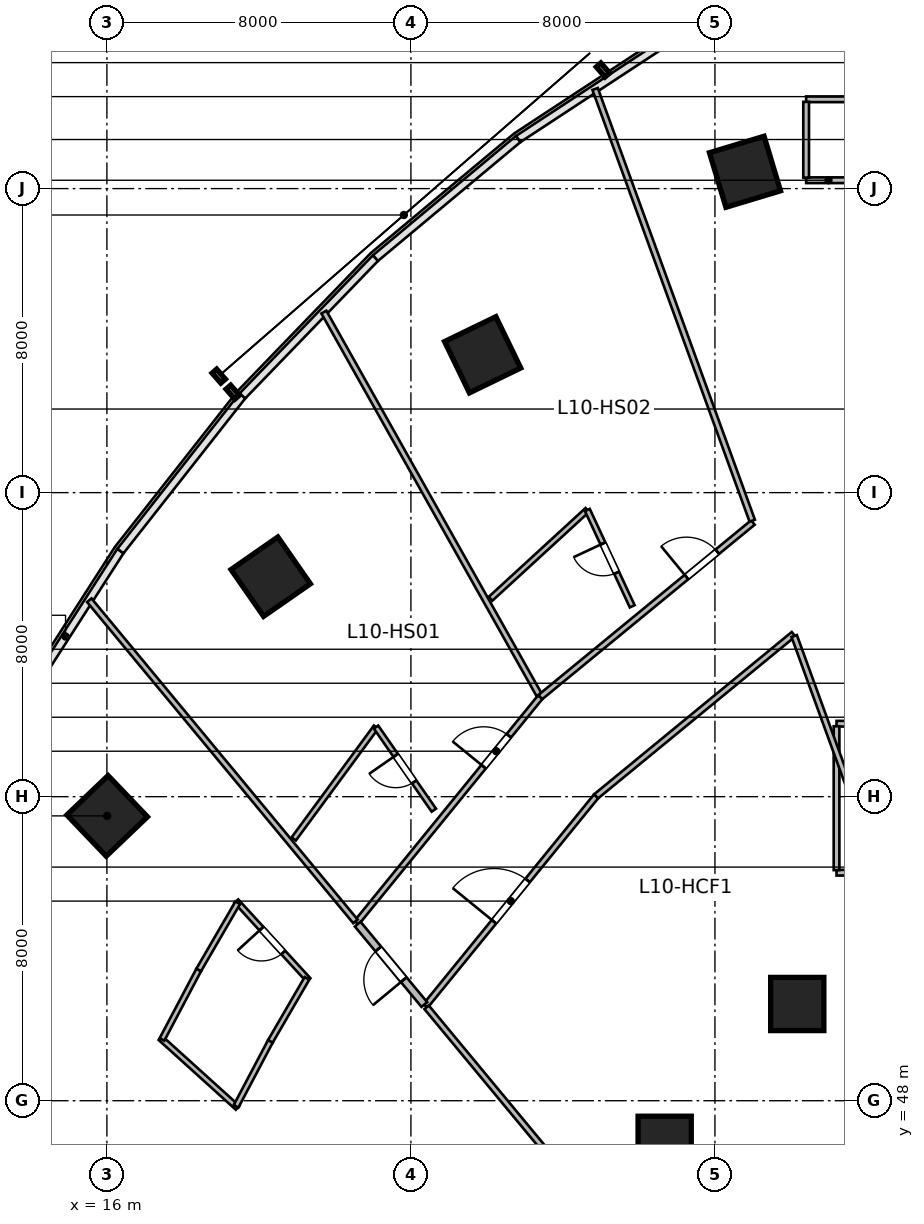
"""IFC4 building model, lengths in metres.
Left out: names, types, materials, properties, quantities, classifications, styles, units other than length and angle.
Written with IfcOpenShell. Run it as: python <this file> out.ifc"""

import sys

from ifc_helpers import new_model, si_unit, direction, frame, frame_2d, origin, origin_2d, place, context, subcontext, project, spatial, rectangle, circle, extrude, source, transform, mapped, element, fill, save


model = new_model("IFC4")
c1 = context("Model", 3, precision=1e-05, world=origin(), true_north=direction((0.0, 1.0)))
c2 = subcontext(c1, "Body", "Model", "MODEL_VIEW")
j1 = project(units=[si_unit("LENGTHUNIT", "METRE"), si_unit("PLANEANGLEUNIT", "RADIAN")], contexts=[c1])
p1 = place(None, origin())
s1 = spatial("IfcSite", under=j1, at=p1, CompositionType="ELEMENT")
p2 = place(p1, origin())
s2 = spatial("IfcBuilding", under=s1, at=p2, CompositionType="ELEMENT")
p3 = place(p2, frame((0.0, 0.0, 49.8)))
s3 = spatial("IfcBuildingStorey", under=s2, at=p3, CompositionType="ELEMENT", Elevation=49.8)
m1 = source(origin(), c2, "Body", "SweptSolid", [
    extrude(rectangle(XDim=1.5, YDim=1.5, at=origin_2d()), origin(), (0.0, 0.0, 1.0), 3.6),
])
p4 = place(p3, frame((16.007, 55.494, 0.0), z_axis=(0.0, 0.0, 1.0), x_axis=(-0.690756218984, 0.723087716626, 0.0)))
e1 = element("IfcColumn", 1, at=p4, inside=s3, PredefinedType="COLUMN", context=c2, shape_type="MappedRepresentation", body=[
    mapped(m1, transform((0.0, 0.0, 0.0), scale=1.0)),
])
m2 = source(origin(), c2, "Body", "SweptSolid", [
    extrude(circle(Radius=0.7, at=origin_2d()), origin(), (0.0, 0.0, 1.0), 3.6),
])
p5 = place(p3, frame((30.677, 46.892, 0.0), z_axis=(0.0, 0.0, 1.0), x_axis=(-0.571143442153, 0.820850271661, 0.0)))
e2 = element("IfcColumn", 2, at=p5, inside=s3, PredefinedType="COLUMN", context=c2, shape_type="MappedRepresentation", body=[
    mapped(m2, transform((0.0, 0.0, 0.0), scale=1.0)),
])
p6 = place(p3, frame((20.311, 61.789, 0.0), z_axis=(0.0, 0.0, 1.0), x_axis=(-0.571143442153, 0.820850271661, 0.0)))
e3 = element("IfcColumn", 3, at=p6, inside=s3, PredefinedType="COLUMN", context=c2, shape_type="MappedRepresentation", body=[
    mapped(m1, transform((0.0, 0.0, 0.0), scale=1.0)),
])
p7 = place(p3, frame((34.166, 50.545, 0.0), z_axis=(0.0, 0.0, 1.0), x_axis=(-0.436173672171, 0.899862504889, 0.0)))
e4 = element("IfcColumn", 4, at=p7, inside=s3, PredefinedType="COLUMN", context=c2, shape_type="MappedRepresentation", body=[
    mapped(m2, transform((0.0, 0.0, 0.0), scale=1.0)),
])
for number, where, z_axis, x_axis in (
    (5, (25.888, 67.627, 0.0), (0.0, 0.0, 1.0), (-0.436, 0.9, 0.0)),
    (6, (32.791, 72.442, 0.0), (0.0, 0.0, 1.0), (-0.289, 0.957, 0.0)),
):
    element("IfcColumn", number, at=place(p3, frame(where, z_axis=z_axis, x_axis=x_axis)), inside=s3, PredefinedType="COLUMN", context=c2, shape_type="MappedRepresentation", body=[
        mapped(m1, transform((0.0, 0.0, 0.0), scale=1.0)),
    ])
m3 = source(origin(), c2, "Body", "SweptSolid", [
    extrude(rectangle(XDim=2.1, YDim=0.15, at=frame_2d((1.05, 0.0))), origin(), (0.0, 0.0, 1.0), 3.36),
])
p8 = place(p3, frame((34.4, 72.22, 0.0), z_axis=(0.0, 0.0, 1.0), x_axis=(1.0, 0.0, 0.0)))
e7 = element("IfcWall", 7, at=p8, inside=s3, PredefinedType="PARTITIONING", context=c2, shape_type="MappedRepresentation", body=[
    mapped(m3, transform((0.0, 0.0, 0.0), scale=1.0)),
])
m4 = source(origin(), c2, "Body", "SweptSolid", [
    extrude(rectangle(XDim=3.1, YDim=0.15, at=frame_2d((1.55, 0.0))), origin(), (0.0, 0.0, 1.0), 2.729),
])
p9 = place(p3, frame((34.4, 74.35, 0.0), z_axis=(0.0, 0.0, 1.0), x_axis=(1.0, 0.0, 0.0)))
e8 = element("IfcWall", 8, at=p9, inside=s3, PredefinedType="PARTITIONING", context=c2, shape_type="MappedRepresentation", body=[
    mapped(m4, transform((0.0, 0.0, 0.0), scale=1.0)),
])
m5 = source(origin(), c2, "Body", "SweptSolid", [
    extrude(rectangle(XDim=1.995, YDim=0.15, at=frame_2d((0.998, 0.0))), origin(), (0.0, 0.0, 1.0), 3.36),
])
p10 = place(p3, frame((34.4, 72.288, 0.0), z_axis=(0.0, 0.0, 1.0), x_axis=(0.0, 1.0, 0.0)))
e9 = element("IfcWall", 9, at=p10, inside=s3, PredefinedType="PARTITIONING", context=c2, shape_type="MappedRepresentation", body=[
    mapped(m5, transform((0.0, 0.0, 0.0), scale=1.0)),
])
m6 = source(origin(), c2, "Body", "SweptSolid", [
    extrude(rectangle(XDim=6.6, YDim=0.15, at=frame_2d((3.3, 0.0))), origin(), (0.0, 0.0, 1.0), 2.803),
])
p11 = place(p3, frame((35.2, 54.0, 0.0), z_axis=(0.0, 0.0, 1.0), x_axis=(1.0, 0.0, 0.0)))
e10 = element("IfcWall", 10, at=p11, inside=s3, PredefinedType="PARTITIONING", context=c2, shape_type="MappedRepresentation", body=[
    mapped(m6, transform((0.0, 0.0, 0.0), scale=1.0)),
])
m7 = source(origin(), c2, "Body", "SweptSolid", [
    extrude(rectangle(XDim=6.6, YDim=0.15, at=frame_2d((3.3, 0.0))), origin(), (0.0, 0.0, 1.0), 3.36),
])
p12 = place(p3, frame((35.2, 57.92, 0.0), z_axis=(0.0, 0.0, 1.0), x_axis=(1.0, 0.0, 0.0)))
e11 = element("IfcWall", 11, at=p12, inside=s3, PredefinedType="PARTITIONING", context=c2, shape_type="MappedRepresentation", body=[
    mapped(m7, transform((0.0, 0.0, 0.0), scale=1.0)),
])
p13 = place(p12, frame((2.85, 0.0, 0.0)))
e12 = element("IfcOpeningElement", 12, at=p13, cuts=e11, PredefinedType="OPENING", context=c2, shape_type="SweptSolid", body=[
    extrude(rectangle(XDim=0.9, YDim=2.1, at=frame_2d((0.45, 1.05))), frame((0.0, 0.085, 0.0), z_axis=(0.0, -1.0, 0.0), x_axis=(1.0, 0.0, 0.0)), (0.0, 0.0, 1.0), 0.17),
])
m8 = source(origin(), c2, "Body", "SweptSolid", [
    extrude(rectangle(XDim=3.785, YDim=0.15, at=frame_2d((1.893, 0.0))), origin(), (0.0, 0.0, 1.0), 3.36),
])
p14 = place(p3, frame((35.2, 54.067, 0.0), z_axis=(0.0, 0.0, 1.0), x_axis=(0.0, 1.0, 0.0)))
e13 = element("IfcWall", 13, at=p14, inside=s3, PredefinedType="PARTITIONING", context=c2, shape_type="MappedRepresentation", body=[
    mapped(m8, transform((0.0, 0.0, 0.0), scale=1.0)),
])
m9 = source(origin(), c2, "Body", "SweptSolid", [
    extrude(rectangle(XDim=7.659, YDim=0.15, at=frame_2d((3.829, 0.0))), origin(), (0.0, 0.0, 1.0), 3.36),
])
p15 = place(p3, frame((22.57, 52.683, 0.0), z_axis=(0.0, 0.0, 1.0), x_axis=(0.631489868862, 0.775384127723, 0.0)))
e14 = element("IfcWall", 14, at=p15, inside=s3, PredefinedType="PARTITIONING", context=c2, shape_type="MappedRepresentation", body=[
    mapped(m9, transform((0.0, 0.0, 0.0), scale=1.0)),
])
p16 = place(p15, frame((5.295, 0.0, 0.0)))
e15 = element("IfcOpeningElement", 15, at=p16, cuts=e14, PredefinedType="OPENING", context=c2, shape_type="SweptSolid", body=[
    extrude(rectangle(XDim=1.05, YDim=2.15, at=frame_2d((0.525, 1.075))), frame((0.0, 0.085, 0.0), z_axis=(0.0, -1.0, 0.0), x_axis=(1.0, 0.0, 0.0)), (0.0, 0.0, 1.0), 0.17),
])
m10 = source(origin(), c2, "Body", "SweptSolid", [
    extrude(rectangle(XDim=10.975, YDim=0.15, at=frame_2d((5.487, 0.0))), origin(), (0.0, 0.0, 1.0), 3.36),
])
p17 = place(p3, frame((22.54, 52.719, 0.0), z_axis=(0.0, 0.0, 1.0), x_axis=(-0.638125265812, 0.769932558821, 0.0)))
e16 = element("IfcWall", 16, at=p17, inside=s3, PredefinedType="PARTITIONING", context=c2, shape_type="MappedRepresentation", body=[
    mapped(m10, transform((0.0, 0.0, 0.0), scale=1.0)),
])
m11 = source(origin(), c2, "Body", "SweptSolid", [
    extrude(rectangle(XDim=11.573, YDim=0.15, at=frame_2d((5.786, 0.0))), origin(), (0.0, 0.0, 1.0), 3.36),
])
p18 = place(p3, frame((27.382, 58.664, 0.0), z_axis=(0.0, 0.0, 1.0), x_axis=(-0.490161073951, 0.871631872744, 0.0)))
e17 = element("IfcWall", 17, at=p18, inside=s3, PredefinedType="PARTITIONING", context=c2, shape_type="MappedRepresentation", body=[
    mapped(m11, transform((0.0, 0.0, 0.0), scale=1.0)),
])
m12 = source(origin(), c2, "Body", "SweptSolid", [
    extrude(rectangle(XDim=3.656, YDim=0.14, at=frame_2d((1.828, 0.0))), origin(), (0.0, 0.0, 1.0), 3.36),
])
p19 = place(p3, frame((20.915, 54.886, 0.0), z_axis=(0.0, 0.0, 1.0), x_axis=(0.592700141555, 0.805423206892, 0.0)))
e18 = element("IfcWall", 18, at=p19, inside=s3, PredefinedType="PARTITIONING", context=c2, shape_type="MappedRepresentation", body=[
    mapped(m12, transform((0.0, 0.0, 0.0), scale=1.0)),
])
m13 = source(origin(), c2, "Body", "SweptSolid", [
    extrude(rectangle(XDim=2.663, YDim=0.14, at=frame_2d((1.332, 0.0))), origin(), (0.0, 0.0, 1.0), 2.644),
])
p20 = place(p3, frame((24.603, 55.645, 0.0), z_axis=(0.0, 0.0, 1.0), x_axis=(-0.570905989724, 0.821015438891, 0.0)))
e19 = element("IfcWall", 19, at=p20, inside=s3, PredefinedType="PARTITIONING", context=c2, shape_type="MappedRepresentation", body=[
    mapped(m13, transform((0.0, 0.0, 0.0), scale=1.0)),
])
p21 = place(p20, frame((0.906, 0.0, 0.0)))
e20 = element("IfcOpeningElement", 20, at=p21, cuts=e19, PredefinedType="OPENING", context=c2, shape_type="SweptSolid", body=[
    extrude(rectangle(XDim=0.85, YDim=2.05, at=frame_2d((0.425, 1.025))), frame((0.0, 0.08, 0.0), z_axis=(0.0, -1.0, 0.0), x_axis=(1.0, 0.0, 0.0)), (0.0, 0.0, 1.0), 0.16),
])
m14 = source(origin(), c2, "Body", "SweptSolid", [
    extrude(rectangle(XDim=7.237, YDim=0.15, at=frame_2d((3.618, 0.0))), origin(), (0.0, 0.0, 1.0), 3.36),
])
p22 = place(p3, frame((27.406, 58.621, 0.0), z_axis=(0.0, 0.0, 1.0), x_axis=(0.772813707793, 0.634632943557, 0.0)))
e21 = element("IfcWall", 21, at=p22, inside=s3, PredefinedType="PARTITIONING", context=c2, shape_type="MappedRepresentation", body=[
    mapped(m14, transform((0.0, 0.0, 0.0), scale=1.0)),
])
p23 = place(p22, frame((4.975, 0.0, 0.0)))
e22 = element("IfcOpeningElement", 22, at=p23, cuts=e21, PredefinedType="OPENING", context=c2, shape_type="SweptSolid", body=[
    extrude(rectangle(XDim=1.05, YDim=2.15, at=frame_2d((0.525, 1.075))), frame((0.0, 0.085, 0.0), z_axis=(0.0, -1.0, 0.0), x_axis=(1.0, 0.0, 0.0)), (0.0, 0.0, 1.0), 0.17),
])
m15 = source(origin(), c2, "Body", "SweptSolid", [
    extrude(rectangle(XDim=12.088, YDim=0.15, at=frame_2d((6.044, 0.0))), origin(), (0.0, 0.0, 1.0), 3.36),
])
p24 = place(p3, frame((32.981, 63.262, 0.0), z_axis=(0.0, 0.0, 1.0), x_axis=(-0.34203007529, 0.939689005787, 0.0)))
e23 = element("IfcWall", 23, at=p24, inside=s3, PredefinedType="PARTITIONING", context=c2, shape_type="MappedRepresentation", body=[
    mapped(m15, transform((0.0, 0.0, 0.0), scale=1.0)),
])
m16 = source(origin(), c2, "Body", "SweptSolid", [
    extrude(rectangle(XDim=3.456, YDim=0.14, at=frame_2d((1.728, 0.0))), origin(), (0.0, 0.0, 1.0), 3.36),
])
p25 = place(p3, frame((26.095, 61.207, 0.0), z_axis=(0.0, 0.0, 1.0), x_axis=(0.736860870293, 0.676044420013, 0.0)))
e24 = element("IfcWall", 24, at=p25, inside=s3, PredefinedType="PARTITIONING", context=c2, shape_type="MappedRepresentation", body=[
    mapped(m16, transform((0.0, 0.0, 0.0), scale=1.0)),
])
m17 = source(origin(), c2, "Body", "SweptSolid", [
    extrude(rectangle(XDim=2.796, YDim=0.14, at=frame_2d((1.398, 0.0))), origin(), (0.0, 0.0, 1.0), 3.36),
])
p26 = place(p3, frame((29.823, 61.009, 0.0), z_axis=(0.0, 0.0, 1.0), x_axis=(-0.422316594955, 0.906448395456, 0.0)))
e25 = element("IfcWall", 25, at=p26, inside=s3, PredefinedType="PARTITIONING", context=c2, shape_type="MappedRepresentation", body=[
    mapped(m17, transform((0.0, 0.0, 0.0), scale=1.0)),
])
p27 = place(p26, frame((0.973, 0.0, 0.0)))
e26 = element("IfcOpeningElement", 26, at=p27, cuts=e25, PredefinedType="OPENING", context=c2, shape_type="SweptSolid", body=[
    extrude(rectangle(XDim=0.85, YDim=2.05, at=frame_2d((0.425, 1.025))), frame((0.0, 0.08, 0.0), z_axis=(0.0, -1.0, 0.0), x_axis=(1.0, 0.0, 0.0)), (0.0, 0.0, 1.0), 0.16),
])
m18 = source(origin(), c2, "Body", "SweptSolid", [
    extrude(rectangle(XDim=7.113, YDim=0.15, at=frame_2d((3.556, 0.0))), origin(), (0.0, 0.0, 1.0), 3.36),
])
p28 = place(p3, frame((24.383, 50.495, 0.0), z_axis=(0.0, 0.0, 1.0), x_axis=(0.63149032532, 0.775383755974, 0.0)))
e27 = element("IfcWall", 27, at=p28, inside=s3, PredefinedType="PARTITIONING", context=c2, shape_type="MappedRepresentation", body=[
    mapped(m18, transform((0.0, 0.0, 0.0), scale=1.0)),
])
p29 = place(p28, frame((2.856, 0.0, 0.0)))
e28 = element("IfcOpeningElement", 28, at=p29, cuts=e27, PredefinedType="OPENING", context=c2, shape_type="SweptSolid", body=[
    extrude(rectangle(XDim=1.4, YDim=2.15, at=frame_2d((0.7, 1.075))), frame((0.0, 0.085, 0.0), z_axis=(0.0, -1.0, 0.0), x_axis=(1.0, 0.0, 0.0)), (0.0, 0.0, 1.0), 0.17),
])
m19 = source(origin(), c2, "Body", "SweptSolid", [
    extrude(rectangle(XDim=6.721, YDim=0.15, at=frame_2d((3.361, 0.0))), origin(), (0.0, 0.0, 1.0), 3.36),
])
p30 = place(p3, frame((28.874, 56.01, 0.0), z_axis=(0.0, 0.0, 1.0), x_axis=(0.772828051199, 0.63461547671, 0.0)))
e29 = element("IfcWall", 29, at=p30, inside=s3, PredefinedType="PARTITIONING", context=c2, shape_type="MappedRepresentation", body=[
    mapped(m19, transform((0.0, 0.0, 0.0), scale=1.0)),
])
m20 = source(origin(), c2, "Body", "SweptSolid", [
    extrude(rectangle(XDim=11.053, YDim=0.15, at=frame_2d((5.527, 0.0))), origin(), (0.0, 0.0, 1.0), 3.36),
])
p31 = place(p3, frame((31.466, 41.949, 0.0), z_axis=(0.0, 0.0, 1.0), x_axis=(-0.638131235571, 0.769927611005, 0.0)))
e30 = element("IfcWall", 30, at=p31, inside=s3, PredefinedType="PARTITIONING", context=c2, shape_type="MappedRepresentation", body=[
    mapped(m20, transform((0.0, 0.0, 0.0), scale=1.0)),
])
m21 = source(origin(), c2, "Body", "SweptSolid", [
    extrude(rectangle(XDim=12.196, YDim=0.15, at=frame_2d((6.098, 0.0))), origin(), (0.0, 0.0, 1.0), 3.36),
])
p32 = place(p3, frame((38.258, 48.766, 0.0), z_axis=(0.0, 0.0, 1.0), x_axis=(-0.342022711534, 0.939691686031, 0.0)))
e31 = element("IfcWall", 31, at=p32, inside=s3, PredefinedType="PARTITIONING", context=c2, shape_type="MappedRepresentation", body=[
    mapped(m21, transform((0.0, 0.0, 0.0), scale=1.0)),
])
m22 = source(origin(), c2, "Body", "SweptSolid", [
    extrude(rectangle(XDim=2.748, YDim=0.195, at=frame_2d((1.374, 0.0))), origin(), (0.0, 0.0, 1.0), 3.36),
])
p33 = place(p3, frame((24.353, 50.531, 0.0), z_axis=(0.0, 0.0, 1.0), x_axis=(-0.638111168284, 0.769944242729, 0.0)))
e32 = element("IfcWall", 32, at=p33, inside=s3, PredefinedType="PARTITIONING", context=c2, shape_type="MappedRepresentation", body=[
    mapped(m22, transform((0.0, 0.0, 0.0), scale=1.0)),
])
p34 = place(p33, frame((0.849, 0.0, 0.0)))
e33 = element("IfcOpeningElement", 33, at=p34, cuts=e32, PredefinedType="OPENING", context=c2, shape_type="SweptSolid", body=[
    extrude(rectangle(XDim=1.05, YDim=2.15, at=frame_2d((0.525, 1.075))), frame((0.0, 0.107, 0.0), z_axis=(0.0, -1.0, 0.0), x_axis=(1.0, 0.0, 0.0)), (0.0, 0.0, 1.0), 0.215),
])
m23 = source(origin(), c2, "Body", "SweptSolid", [
    extrude(rectangle(XDim=2.812, YDim=0.14, at=frame_2d((1.406, 0.0))), origin(), (0.0, 0.0, 1.0), 3.36),
])
p35 = place(p3, frame((21.303, 51.177, 0.0), z_axis=(0.0, 0.0, 1.0), x_axis=(-0.675119025852, 0.737708818527, 0.0)))
e34 = element("IfcWall", 34, at=p35, inside=s3, PredefinedType="PARTITIONING", context=c2, shape_type="MappedRepresentation", body=[
    mapped(m23, transform((0.0, 0.0, 0.0), scale=1.0)),
])
p36 = place(p35, frame((0.981, 0.0, 0.0)))
e35 = element("IfcOpeningElement", 35, at=p36, cuts=e34, PredefinedType="OPENING", context=c2, shape_type="SweptSolid", body=[
    extrude(rectangle(XDim=0.85, YDim=2.05, at=frame_2d((0.425, 1.025))), frame((0.0, 0.08, 0.0), z_axis=(0.0, -1.0, 0.0), x_axis=(1.0, 0.0, 0.0)), (0.0, 0.0, 1.0), 0.16),
])
m24 = source(origin(), c2, "Body", "SweptSolid", [
    extrude(rectangle(XDim=2.738, YDim=0.14, at=frame_2d((1.369, 0.0))), origin(), (0.0, 0.0, 1.0), 3.36),
])
p37 = place(p3, frame((19.44, 47.814, 0.0), z_axis=(0.0, 0.0, 1.0), x_axis=(-0.741873676582, 0.670539669218, 0.0)))
e36 = element("IfcWall", 36, at=p37, inside=s3, PredefinedType="PARTITIONING", context=c2, shape_type="MappedRepresentation", body=[
    mapped(m24, transform((0.0, 0.0, 0.0), scale=1.0)),
])
m25 = source(origin(), c2, "Body", "SweptSolid", [
    extrude(rectangle(XDim=1.936, YDim=0.14, at=frame_2d((0.968, 0.0))), origin(), (0.0, 0.0, 1.0), 3.36),
])
p38 = place(p3, frame((19.398, 47.852, 0.0), z_axis=(0.0, 0.0, 1.0), x_axis=(0.467174971862, 0.884164886017, 0.0)))
e37 = element("IfcWall", 37, at=p38, inside=s3, PredefinedType="PARTITIONING", context=c2, shape_type="MappedRepresentation", body=[
    mapped(m25, transform((0.0, 0.0, 0.0), scale=1.0)),
])
m26 = source(origin(), c2, "Body", "SweptSolid", [
    extrude(rectangle(XDim=2.068, YDim=0.14, at=frame_2d((1.034, 0.0))), origin(), (0.0, 0.0, 1.0), 3.36),
])
p39 = place(p3, frame((17.45, 49.612, 0.0), z_axis=(0.0, 0.0, 1.0), x_axis=(0.467215057643, 0.884143704333, 0.0)))
e38 = element("IfcWall", 38, at=p39, inside=s3, PredefinedType="PARTITIONING", context=c2, shape_type="MappedRepresentation", body=[
    mapped(m26, transform((0.0, 0.0, 0.0), scale=1.0)),
])
m27 = source(origin(), c2, "Body", "SweptSolid", [
    extrude(rectangle(XDim=1.914, YDim=0.14, at=frame_2d((0.957, 0.0))), origin(), (0.0, 0.0, 1.0), 3.36),
])
p40 = place(p3, frame((20.303, 49.563, 0.0), z_axis=(0.0, 0.0, 1.0), x_axis=(0.502347790612, 0.864665656347, 0.0)))
e39 = element("IfcWall", 39, at=p40, inside=s3, PredefinedType="PARTITIONING", context=c2, shape_type="MappedRepresentation", body=[
    mapped(m27, transform((0.0, 0.0, 0.0), scale=1.0)),
])
m28 = source(origin(), c2, "Body", "SweptSolid", [
    extrude(rectangle(XDim=2.045, YDim=0.14, at=frame_2d((1.022, 0.0))), origin(), (0.0, 0.0, 1.0), 3.36),
])
p41 = place(p3, frame((18.416, 51.441, 0.0), z_axis=(0.0, 0.0, 1.0), x_axis=(0.5023112139, 0.864686905411, 0.0)))
e40 = element("IfcWall", 40, at=p41, inside=s3, PredefinedType="PARTITIONING", context=c2, shape_type="MappedRepresentation", body=[
    mapped(m28, transform((0.0, 0.0, 0.0), scale=1.0)),
])
m29 = source(origin(), c2, "Body", "SweptSolid", [
    extrude(rectangle(XDim=1.05, YDim=2.15, at=frame_2d((0.525, 1.075))), frame((0.0, 0.025, 0.0), z_axis=(0.0, -1.0, 0.0), x_axis=(1.0, 0.0, 0.0)), (0.0, 0.0, 1.0), 0.05),
])
p42 = place(p16, origin())
e41 = element("IfcDoor", 41, at=p42, inside=s3, OperationType="SINGLE_SWING_LEFT", PredefinedType="DOOR", context=c2, shape_type="MappedRepresentation", body=[
    mapped(m29, transform((0.0, 0.0, 0.0), scale=1.0)),
])
fill(e15, e41)
m30 = source(origin(), c2, "Body", "SweptSolid", [
    extrude(rectangle(XDim=0.85, YDim=2.05, at=frame_2d((0.425, 1.025))), frame((0.0, 0.025, 0.0), z_axis=(0.0, -1.0, 0.0), x_axis=(1.0, 0.0, 0.0)), (0.0, 0.0, 1.0), 0.05),
])
p43 = place(p21, origin())
e42 = element("IfcDoor", 42, at=p43, inside=s3, OperationType="SINGLE_SWING_RIGHT", PredefinedType="DOOR", context=c2, shape_type="MappedRepresentation", body=[
    mapped(m30, transform((0.0, 0.0, 0.0), scale=1.0)),
])
fill(e20, e42)
p44 = place(p23, origin())
e43 = element("IfcDoor", 43, at=p44, inside=s3, OperationType="SINGLE_SWING_LEFT", PredefinedType="DOOR", context=c2, shape_type="MappedRepresentation", body=[
    mapped(m29, transform((0.0, 0.0, 0.0), scale=1.0)),
])
fill(e22, e43)
p45 = place(p27, origin())
e44 = element("IfcDoor", 44, at=p45, inside=s3, OperationType="SINGLE_SWING_RIGHT", PredefinedType="DOOR", context=c2, shape_type="MappedRepresentation", body=[
    mapped(m30, transform((0.0, 0.0, 0.0), scale=1.0)),
])
fill(e26, e44)
m31 = source(origin(), c2, "Body", "SweptSolid", [
    extrude(rectangle(XDim=1.4, YDim=2.15, at=frame_2d((0.7, 1.075))), frame((0.0, 0.025, 0.0), z_axis=(0.0, -1.0, 0.0), x_axis=(1.0, 0.0, 0.0)), (0.0, 0.0, 1.0), 0.05),
])
p46 = place(p29, origin())
e45 = element("IfcDoor", 45, at=p46, inside=s3, OperationType="SINGLE_SWING_LEFT", PredefinedType="DOOR", context=c2, shape_type="MappedRepresentation", body=[
    mapped(m31, transform((0.0, 0.0, 0.0), scale=1.0)),
])
fill(e28, e45)
p47 = place(p34, origin())
e46 = element("IfcDoor", 46, at=p47, inside=s3, OperationType="SINGLE_SWING_LEFT", PredefinedType="DOOR", context=c2, shape_type="MappedRepresentation", body=[
    mapped(m29, transform((0.0, 0.0, 0.0), scale=1.0)),
])
fill(e33, e46)
p48 = place(p36, origin())
e47 = element("IfcDoor", 47, at=p48, inside=s3, OperationType="SINGLE_SWING_RIGHT", PredefinedType="DOOR", context=c2, shape_type="MappedRepresentation", body=[
    mapped(m30, transform((0.0, 0.0, 0.0), scale=1.0)),
])
fill(e35, e47)
save(model, sys.argv[1])
